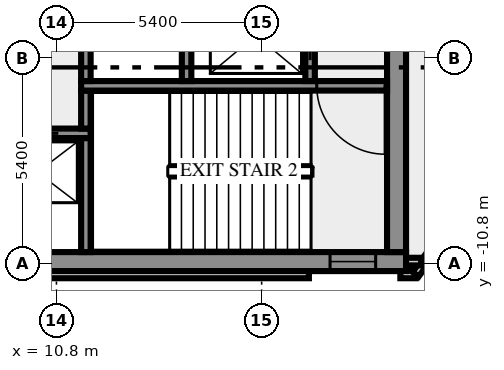
"""IFC4 building model, lengths in metres.
Left out: names, types, materials, properties, quantities, classifications, styles, units other than length and angle.
Written with IfcOpenShell. Run it as: python <this file> out.ifc"""

import sys

from ifc_helpers import new_model, si_unit, direction, frame, frame_2d, origin, place, context, subcontext, project, spatial, rectangle, extrude, element, fill, save


model = new_model("IFC4")
c1 = context("Model", 3, precision=1e-05, world=origin(), true_north=direction((0.0, 1.0)))
c2 = subcontext(c1, "Body", "Model", "MODEL_VIEW")
j1 = project(units=[si_unit("LENGTHUNIT", "METRE"), si_unit("PLANEANGLEUNIT", "RADIAN")], contexts=[c1])
p1 = place(None, origin())
s1 = spatial("IfcSite", under=j1, at=p1, CompositionType="ELEMENT")
p2 = place(p1, origin())
s2 = spatial("IfcBuilding", under=s1, at=p2, CompositionType="ELEMENT")
p3 = place(p2, frame((0.0, 0.0, 172.0)))
s3 = spatial("IfcBuildingStorey", under=s2, at=p3, CompositionType="ELEMENT", Elevation=172.0)
p4 = place(p3, frame((-17.444, -11.088, 0.0), z_axis=(0.0, 0.0, 1.0), x_axis=(1.0, 0.0, 0.0)))
e1 = element("IfcWall", 1, at=p4, inside=s3, PredefinedType="SOLIDWALL", context=c2, shape_type="SweptSolid", body=[
    extrude(rectangle(XDim=34.888, YDim=0.2, at=frame_2d((17.444, 0.0))), origin(), (0.0, 0.0, 1.0), 3.65),
])
p5 = place(p3, frame((19.85, -11.088, 0.0), z_axis=(0.0, 0.0, 1.0), x_axis=(1.0, 0.0, 0.0)))
e2 = element("IfcWall", 2, at=p5, inside=s3, PredefinedType="SOLIDWALL", context=c2, shape_type="SweptSolid", body=[
    extrude(rectangle(XDim=0.406, YDim=0.2, at=frame_2d((0.203, 0.0))), origin(), (0.0, 0.0, 1.0), 3.65),
])
p6 = place(p3, frame((20.253, -11.083, 0.0), z_axis=(0.0, 0.0, 1.0), x_axis=(0.587766567315, 0.809030569476, 0.0)))
e3 = element("IfcWall", 3, at=p6, inside=s3, PredefinedType="SOLIDWALL", context=c2, shape_type="SweptSolid", body=[
    extrude(rectangle(XDim=2.688, YDim=0.2, at=frame_2d((1.344, 0.0))), origin(), (0.0, 0.0, 1.0), 3.65),
])
p7 = place(p3, frame((19.98, -10.75, 0.0), z_axis=(0.0, 0.0, 1.0), x_axis=(1.0, 0.0, 0.0)))
e4 = element("IfcWall", 4, at=p7, inside=s3, PredefinedType="SOLIDWALL", context=c2, shape_type="SweptSolid", body=[
    extrude(rectangle(XDim=0.417, YDim=0.2, at=frame_2d((0.208, 0.0))), origin(), (0.0, 0.0, 1.0), 3.65),
])
p8 = place(p3, frame((-20.0, -10.75, 0.0), z_axis=(0.0, 0.0, 1.0), x_axis=(1.0, 0.0, 0.0)))
e5 = element("IfcWall", 5, at=p8, inside=s3, PredefinedType="SHEAR", context=c2, shape_type="SweptSolid", body=[
    extrude(rectangle(XDim=40.0, YDim=0.5, at=frame_2d((20.0, 0.0))), origin(), (0.0, 0.0, 1.0), 3.65),
])
p9 = place(p8, frame((0.8, 0.0, 1.0)))
e6 = element("IfcOpeningElement", 6, at=p9, cuts=e5, PredefinedType="OPENING", context=c2, shape_type="SweptSolid", body=[
    extrude(rectangle(XDim=1.2, YDim=1.2, at=frame_2d((0.6, 0.6))), frame((0.0, 0.26, 0.0), z_axis=(0.0, -1.0, 0.0), x_axis=(1.0, 0.0, 0.0)), (0.0, 0.0, 1.0), 0.52),
])
p10 = place(p8, frame((38.0, 0.0, 1.0)))
e7 = element("IfcOpeningElement", 7, at=p10, cuts=e5, PredefinedType="OPENING", context=c2, shape_type="SweptSolid", body=[
    extrude(rectangle(XDim=1.2, YDim=1.2, at=frame_2d((0.6, 0.6))), frame((0.0, 0.26, 0.0), z_axis=(0.0, -1.0, 0.0), x_axis=(1.0, 0.0, 0.0)), (0.0, 0.0, 1.0), 0.52),
])
p11 = place(p3, frame((11.575, -10.5, 0.0), z_axis=(0.0, 0.0, 1.0), x_axis=(0.0, 1.0, 0.0)))
e8 = element("IfcWall", 8, at=p11, inside=s3, PredefinedType="SHEAR", context=c2, shape_type="SweptSolid", body=[
    extrude(rectangle(XDim=3.0, YDim=0.25, at=frame_2d((1.5, 0.0))), origin(), (0.0, 0.0, 1.0), 3.65),
])
p12 = place(p3, frame((19.75, -10.5, 0.0), z_axis=(0.0, 0.0, 1.0), x_axis=(0.0, 1.0, 0.0)))
e9 = element("IfcWall", 9, at=p12, inside=s3, PredefinedType="SHEAR", context=c2, shape_type="SweptSolid", body=[
    extrude(rectangle(XDim=8.8, YDim=0.5, at=frame_2d((4.4, 0.0))), origin(), (0.0, 0.0, 1.0), 3.65),
])
p13 = place(p3, frame((11.7, -7.375, 0.0), z_axis=(0.0, 0.0, 1.0), x_axis=(-1.0, 0.0, 0.0)))
e10 = element("IfcWall", 10, at=p13, inside=s3, PredefinedType="SHEAR", context=c2, shape_type="SweptSolid", body=[
    extrude(rectangle(XDim=23.4, YDim=0.25, at=frame_2d((11.7, 0.0))), origin(), (0.0, 0.0, 1.0), 3.65),
])
p14 = place(p13, frame((20.213, 0.0, 0.0)))
e11 = element("IfcOpeningElement", 11, at=p14, cuts=e10, PredefinedType="OPENING", context=c2, shape_type="SweptSolid", body=[
    extrude(rectangle(XDim=0.9, YDim=2.1, at=frame_2d((0.45, 1.05))), frame((0.0, 0.135, 0.0), z_axis=(0.0, -1.0, 0.0), x_axis=(1.0, 0.0, 0.0)), (0.0, 0.0, 1.0), 0.27),
])
p15 = place(p13, frame((16.488, 0.0, 0.0)))
e12 = element("IfcOpeningElement", 12, at=p15, cuts=e10, PredefinedType="OPENING", context=c2, shape_type="SweptSolid", body=[
    extrude(rectangle(XDim=0.9, YDim=2.1, at=frame_2d((0.45, 1.05))), frame((0.0, 0.135, 0.0), z_axis=(0.0, -1.0, 0.0), x_axis=(1.0, 0.0, 0.0)), (0.0, 0.0, 1.0), 0.27),
])
p16 = place(p13, frame((14.45, 0.0, 0.0)))
e13 = element("IfcOpeningElement", 13, at=p16, cuts=e10, PredefinedType="OPENING", context=c2, shape_type="SweptSolid", body=[
    extrude(rectangle(XDim=0.9, YDim=2.1, at=frame_2d((0.45, 1.05))), frame((0.0, 0.135, 0.0), z_axis=(0.0, -1.0, 0.0), x_axis=(1.0, 0.0, 0.0)), (0.0, 0.0, 1.0), 0.27),
])
p17 = place(p13, frame((12.95, 0.0, 0.0)))
e14 = element("IfcOpeningElement", 14, at=p17, cuts=e10, PredefinedType="OPENING", context=c2, shape_type="SweptSolid", body=[
    extrude(rectangle(XDim=0.9, YDim=2.1, at=frame_2d((0.45, 1.05))), frame((0.0, 0.135, 0.0), z_axis=(0.0, -1.0, 0.0), x_axis=(1.0, 0.0, 0.0)), (0.0, 0.0, 1.0), 0.27),
])
p18 = place(p13, frame((11.475, 0.0, 0.0)))
e15 = element("IfcOpeningElement", 15, at=p18, cuts=e10, PredefinedType="OPENING", context=c2, shape_type="SweptSolid", body=[
    extrude(rectangle(XDim=0.9, YDim=2.1, at=frame_2d((0.45, 1.05))), frame((0.0, 0.135, 0.0), z_axis=(0.0, -1.0, 0.0), x_axis=(1.0, 0.0, 0.0)), (0.0, 0.0, 1.0), 0.27),
])
p19 = place(p13, frame((10.45, 0.0, 0.0)))
e16 = element("IfcOpeningElement", 16, at=p19, cuts=e10, PredefinedType="OPENING", context=c2, shape_type="SweptSolid", body=[
    extrude(rectangle(XDim=0.5, YDim=2.1, at=frame_2d((0.25, 1.05))), frame((0.0, 0.135, 0.0), z_axis=(0.0, -1.0, 0.0), x_axis=(1.0, 0.0, 0.0)), (0.0, 0.0, 1.0), 0.27),
])
p20 = place(p13, frame((8.35, 0.0, 0.0)))
e17 = element("IfcOpeningElement", 17, at=p20, cuts=e10, PredefinedType="OPENING", context=c2, shape_type="SweptSolid", body=[
    extrude(rectangle(XDim=1.1, YDim=2.1, at=frame_2d((0.55, 1.05))), frame((0.0, 0.135, 0.0), z_axis=(0.0, -1.0, 0.0), x_axis=(1.0, 0.0, 0.0)), (0.0, 0.0, 1.0), 0.27),
])
p21 = place(p13, frame((5.85, 0.0, 0.0)))
e18 = element("IfcOpeningElement", 18, at=p21, cuts=e10, PredefinedType="OPENING", context=c2, shape_type="SweptSolid", body=[
    extrude(rectangle(XDim=1.1, YDim=2.1, at=frame_2d((0.55, 1.05))), frame((0.0, 0.135, 0.0), z_axis=(0.0, -1.0, 0.0), x_axis=(1.0, 0.0, 0.0)), (0.0, 0.0, 1.0), 0.27),
])
p22 = place(p13, frame((3.35, 0.0, 0.0)))
e19 = element("IfcOpeningElement", 19, at=p22, cuts=e10, PredefinedType="OPENING", context=c2, shape_type="SweptSolid", body=[
    extrude(rectangle(XDim=1.1, YDim=2.1, at=frame_2d((0.55, 1.05))), frame((0.0, 0.135, 0.0), z_axis=(0.0, -1.0, 0.0), x_axis=(1.0, 0.0, 0.0)), (0.0, 0.0, 1.0), 0.27),
])
p23 = place(p13, frame((0.85, 0.0, 0.0)))
e20 = element("IfcOpeningElement", 20, at=p23, cuts=e10, PredefinedType="OPENING", context=c2, shape_type="SweptSolid", body=[
    extrude(rectangle(XDim=1.1, YDim=2.1, at=frame_2d((0.55, 1.05))), frame((0.0, 0.135, 0.0), z_axis=(0.0, -1.0, 0.0), x_axis=(1.0, 0.0, 0.0)), (0.0, 0.0, 1.0), 0.27),
])
p24 = place(p3, frame((11.575, -7.25, 0.0), z_axis=(0.0, 0.0, 1.0), x_axis=(0.0, 1.0, 0.0)))
e21 = element("IfcWall", 21, at=p24, inside=s3, PredefinedType="SHEAR", context=c2, shape_type="SweptSolid", body=[
    extrude(rectangle(XDim=1.0, YDim=0.25, at=frame_2d((0.5, 0.0))), origin(), (0.0, 0.0, 1.0), 3.65),
])
p25 = place(p3, frame((19.5, -6.125, 0.0), z_axis=(0.0, 0.0, 1.0), x_axis=(-1.0, 0.0, 0.0)))
e22 = element("IfcWall", 22, at=p25, inside=s3, PredefinedType="SHEAR", context=c2, shape_type="SweptSolid", body=[
    extrude(rectangle(XDim=8.05, YDim=0.25, at=frame_2d((4.025, 0.0))), origin(), (0.0, 0.0, 1.0), 3.65),
])
p26 = place(p25, frame((0.05, 0.0, 0.0)))
e23 = element("IfcOpeningElement", 23, at=p26, cuts=e22, PredefinedType="OPENING", context=c2, shape_type="SweptSolid", body=[
    extrude(rectangle(XDim=1.8, YDim=2.1, at=frame_2d((0.9, 1.05))), frame((0.0, 0.135, 0.0), z_axis=(0.0, -1.0, 0.0), x_axis=(1.0, 0.0, 0.0)), (0.0, 0.0, 1.0), 0.27),
])
for number, where, z_axis, x_axis in (
    (24, (11.575, -6.0, 0.0), (0.0, 0.0, 1.0), (0.0, 1.0, 0.0)),
    (25, (14.225, -6.0, 0.0), (0.0, 0.0, 1.0), (0.0, 1.0, 0.0)),
):
    element("IfcWall", number, at=place(p3, frame(where, z_axis=z_axis, x_axis=x_axis)), inside=s3, PredefinedType="SHEAR", context=c2, shape_type="SweptSolid", body=[
        extrude(rectangle(XDim=1.75, YDim=0.25, at=frame_2d((0.875, 0.0))), origin(), (0.0, 0.0, 1.0), 3.65),
    ])
p27 = place(p3, frame((17.475, -6.0, 0.0), z_axis=(0.0, 0.0, 1.0), x_axis=(0.0, 1.0, 0.0)))
e26 = element("IfcWall", 26, at=p27, inside=s3, PredefinedType="SHEAR", context=c2, shape_type="SweptSolid", body=[
    extrude(rectangle(XDim=4.3, YDim=0.25, at=frame_2d((2.15, 0.0))), origin(), (0.0, 0.0, 1.0), 3.65),
])
p28 = place(p27, frame((0.55, 0.0, 0.0)))
e27 = element("IfcOpeningElement", 27, at=p28, cuts=e26, PredefinedType="OPENING", context=c2, shape_type="SweptSolid", body=[
    extrude(rectangle(XDim=1.3, YDim=2.1, at=frame_2d((0.65, 1.05))), frame((0.0, 0.135, 0.0), z_axis=(0.0, -1.0, 0.0), x_axis=(1.0, 0.0, 0.0)), (0.0, 0.0, 1.0), 0.27),
])
p29 = place(p10, origin())
e28 = element("IfcWindow", 28, at=p29, inside=s3, PartitioningType="SINGLE_PANEL", PredefinedType="WINDOW", context=c2, shape_type="SweptSolid", body=[
    extrude(rectangle(XDim=1.2, YDim=1.2, at=frame_2d((0.6, 0.6))), frame((0.0, 0.03, 0.0), z_axis=(0.0, -1.0, 0.0), x_axis=(1.0, 0.0, 0.0)), (0.0, 0.0, 1.0), 0.06),
])
fill(e7, e28)
p30 = place(p23, origin())
e29 = element("IfcDoor", 29, at=p30, inside=s3, OperationType="DOUBLE_DOOR_SLIDING", PredefinedType="DOOR", context=c2, shape_type="SweptSolid", body=[
    extrude(rectangle(XDim=1.1, YDim=2.1, at=frame_2d((0.55, 1.05))), frame((0.0, 0.025, 0.0), z_axis=(0.0, -1.0, 0.0), x_axis=(1.0, 0.0, 0.0)), (0.0, 0.0, 1.0), 0.05),
])
fill(e20, e29)
p31 = place(p26, origin())
e30 = element("IfcDoor", 30, at=p31, inside=s3, OperationType="DOUBLE_DOOR_SINGLE_SWING", PredefinedType="DOOR", context=c2, shape_type="SweptSolid", body=[
    extrude(rectangle(XDim=1.8, YDim=2.1, at=frame_2d((0.9, 1.05))), frame((0.0, 0.025, 0.0), z_axis=(0.0, -1.0, 0.0), x_axis=(1.0, 0.0, 0.0)), (0.0, 0.0, 1.0), 0.05),
])
fill(e23, e30)
p32 = place(p28, origin())
e31 = element("IfcDoor", 31, at=p32, inside=s3, OperationType="DOUBLE_DOOR_SLIDING", PredefinedType="DOOR", context=c2, shape_type="SweptSolid", body=[
    extrude(rectangle(XDim=1.3, YDim=2.1, at=frame_2d((0.65, 1.05))), frame((0.0, 0.025, 0.0), z_axis=(0.0, -1.0, 0.0), x_axis=(1.0, 0.0, 0.0)), (0.0, 0.0, 1.0), 0.05),
])
fill(e27, e31)
save(model, sys.argv[1])
